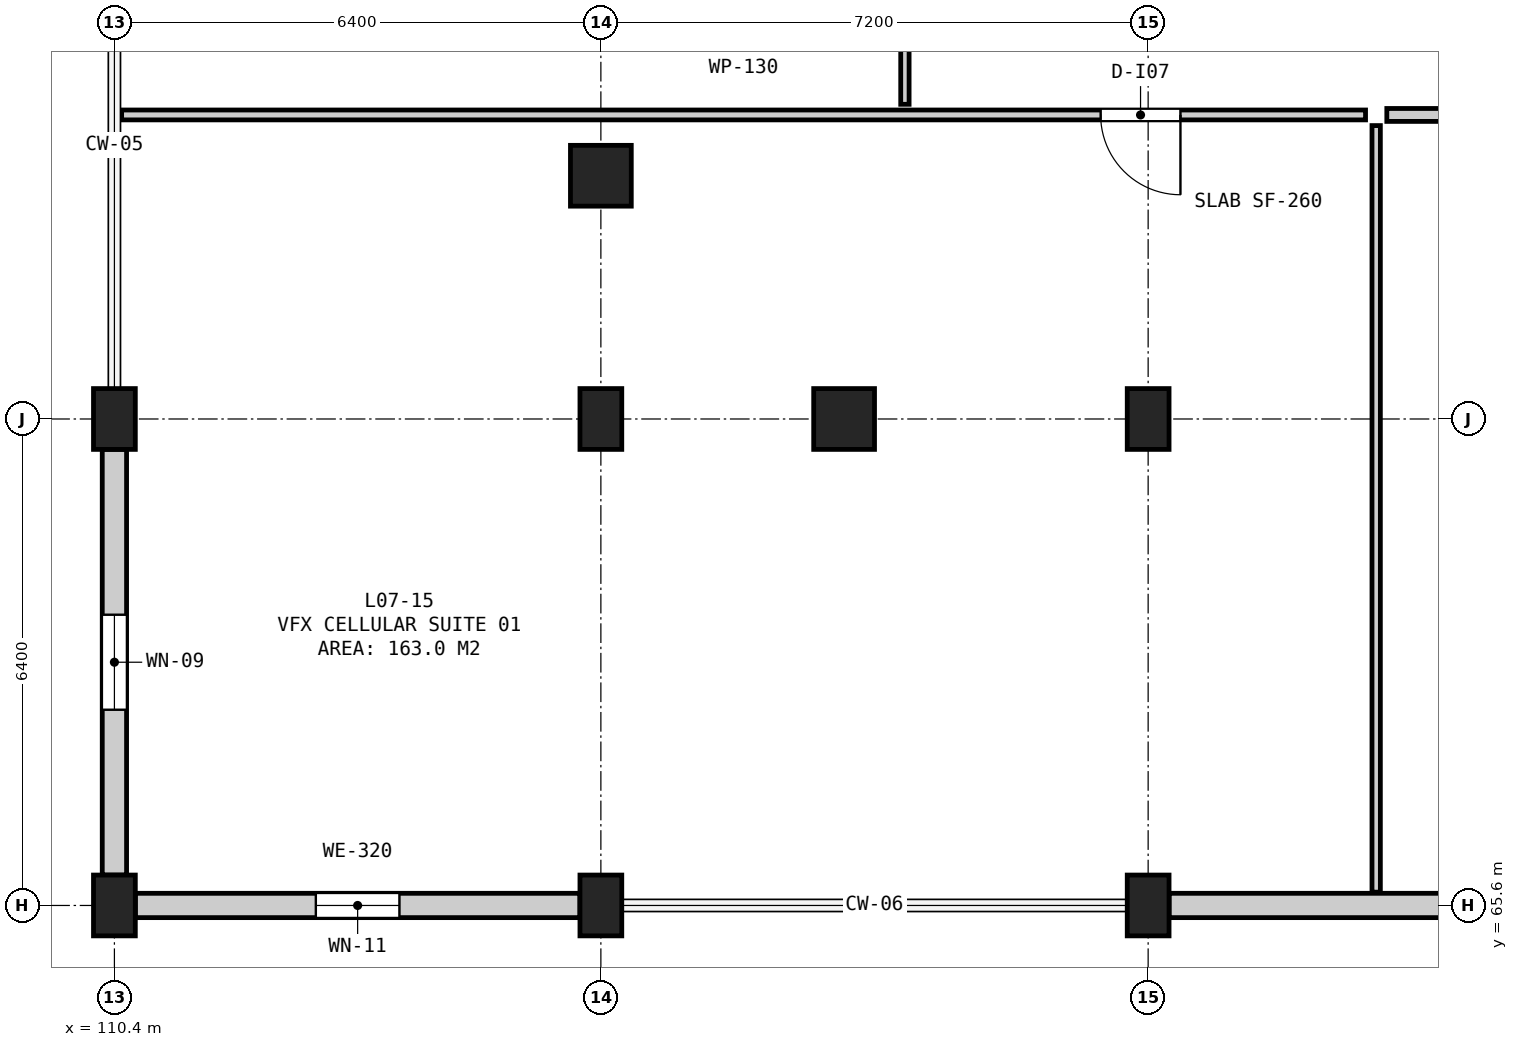
"""IFC4 building model, lengths in metres.
Left out: names, types, materials, properties, quantities, classifications, styles, units other than length and angle.
Written with IfcOpenShell. Run it as: python <this file> out.ifc"""

import sys

from ifc_helpers import new_model, si_unit, direction, frame, frame_2d, origin, origin_2d, place, context, subcontext, project, spatial, rectangle, circle, extrude, element, fill, save


model = new_model("IFC4")
c1 = context("Model", 3, precision=1e-05, world=origin(), true_north=direction((0.0, 1.0)))
c2 = subcontext(c1, "Body", "Model", "MODEL_VIEW")
j1 = project(units=[si_unit("LENGTHUNIT", "METRE"), si_unit("PLANEANGLEUNIT", "RADIAN")], contexts=[c1])
p1 = place(None, origin())
s1 = spatial("IfcSite", under=j1, at=p1, CompositionType="ELEMENT")
p2 = place(p1, origin())
s2 = spatial("IfcBuilding", under=s1, at=p2, CompositionType="ELEMENT")
p3 = place(p2, frame((0.0, 0.0, 31.7)))
s3 = spatial("IfcBuildingStorey", under=s2, at=p3, CompositionType="ELEMENT", Elevation=31.7)
for number, where, z_axis, x_axis in (
    (1, (110.4, 65.6, 0.0), (0.0, 0.0, 1.0), (1.0, 0.0, 0.0)),
    (2, (110.4, 72.0, 0.0), (0.0, 0.0, 1.0), (1.0, 0.0, 0.0)),
    (3, (116.8, 65.6, 0.0), (0.0, 0.0, 1.0), (1.0, 0.0, 0.0)),
    (4, (116.8, 72.0, 0.0), (0.0, 0.0, 1.0), (1.0, 0.0, 0.0)),
):
    element("IfcColumn", number, at=place(p3, frame(where, z_axis=z_axis, x_axis=x_axis)), inside=s3, PredefinedType="COLUMN", context=c2, shape_type="SweptSolid", body=[
        extrude(rectangle(XDim=0.55, YDim=0.8, at=origin_2d()), origin(), (0.0, 0.0, 1.0), 3.9),
    ])
for number, where, z_axis, x_axis in (
    (5, (116.8, 75.2, 0.0), (0.0, 0.0, 1.0), (1.0, 0.0, 0.0)),
    (6, (120.0, 72.0, 0.0), (0.0, 0.0, 1.0), (1.0, 0.0, 0.0)),
):
    element("IfcColumn", number, at=place(p3, frame(where, z_axis=z_axis, x_axis=x_axis)), inside=s3, PredefinedType="COLUMN", context=c2, shape_type="SweptSolid", body=[
        extrude(circle(Radius=0.4, at=origin_2d()), origin(), (0.0, 0.0, 1.0), 3.9),
    ])
for number, where, z_axis, x_axis in (
    (7, (124.0, 65.6, 0.0), (0.0, 0.0, 1.0), (1.0, 0.0, 0.0)),
    (8, (124.0, 72.0, 0.0), (0.0, 0.0, 1.0), (1.0, 0.0, 0.0)),
):
    element("IfcColumn", number, at=place(p3, frame(where, z_axis=z_axis, x_axis=x_axis)), inside=s3, PredefinedType="COLUMN", context=c2, shape_type="SweptSolid", body=[
        extrude(rectangle(XDim=0.55, YDim=0.8, at=origin_2d()), origin(), (0.0, 0.0, 1.0), 3.9),
    ])
p4 = place(p3, frame((110.675, 65.6, 0.0), z_axis=(0.0, 0.0, 1.0), x_axis=(1.0, 0.0, 0.0)))
e9 = element("IfcWall", 9, at=p4, inside=s3, PredefinedType="SOLIDWALL", context=c2, shape_type="SweptSolid", body=[
    extrude(rectangle(XDim=5.85, YDim=0.32, at=frame_2d((2.925, 0.0))), origin(), (0.0, 0.0, 1.0), 3.04),
])
p5 = place(p4, frame((2.375, 0.0, 0.9)))
e10 = element("IfcOpeningElement", 10, at=p5, cuts=e9, PredefinedType="OPENING", context=c2, shape_type="SweptSolid", body=[
    extrude(rectangle(XDim=1.1, YDim=1.55, at=frame_2d((0.55, 0.775))), frame((0.0, 0.172, 0.0), z_axis=(0.0, -1.0, 0.0), x_axis=(1.0, 0.0, 0.0)), (0.0, 0.0, 1.0), 0.344),
])
p6 = place(p3, frame((124.275, 65.6, 0.0), z_axis=(0.0, 0.0, 1.0), x_axis=(1.0, 0.0, 0.0)))
e11 = element("IfcWall", 11, at=p6, inside=s3, PredefinedType="SOLIDWALL", context=c2, shape_type="SweptSolid", body=[
    extrude(rectangle(XDim=7.45, YDim=0.32, at=frame_2d((3.725, 0.0))), origin(), (0.0, 0.0, 1.0), 3.025),
])
p7 = place(p6, frame((4.95, 0.0, 0.9)))
e12 = element("IfcOpeningElement", 12, at=p7, cuts=e11, PredefinedType="OPENING", context=c2, shape_type="SweptSolid", body=[
    extrude(rectangle(XDim=0.85, YDim=1.35, at=frame_2d((0.425, 0.675))), frame((0.0, 0.172, 0.0), z_axis=(0.0, -1.0, 0.0), x_axis=(1.0, 0.0, 0.0)), (0.0, 0.0, 1.0), 0.344),
])
p8 = place(p3, frame((110.4, 71.6, 0.0), z_axis=(0.0, 0.0, 1.0), x_axis=(0.0, -1.0, 0.0)))
e13 = element("IfcWall", 13, at=p8, inside=s3, PredefinedType="SOLIDWALL", context=c2, shape_type="SweptSolid", body=[
    extrude(rectangle(XDim=5.6, YDim=0.32, at=frame_2d((2.8, 0.0))), origin(), (0.0, 0.0, 1.0), 3.04),
])
p9 = place(p8, frame((2.175, 0.0, 0.9)))
e14 = element("IfcOpeningElement", 14, at=p9, cuts=e13, PredefinedType="OPENING", context=c2, shape_type="SweptSolid", body=[
    extrude(rectangle(XDim=1.25, YDim=1.9, at=frame_2d((0.625, 0.95))), frame((0.0, 0.172, 0.0), z_axis=(0.0, -1.0, 0.0), x_axis=(1.0, 0.0, 0.0)), (0.0, 0.0, 1.0), 0.344),
])
p10 = place(p3, frame((110.495, 76.0, 0.0), z_axis=(0.0, 0.0, 1.0), x_axis=(1.0, 0.0, 0.0)))
e15 = element("IfcWall", 15, at=p10, inside=s3, PredefinedType="PARTITIONING", context=c2, shape_type="SweptSolid", body=[
    extrude(rectangle(XDim=16.365, YDim=0.13, at=frame_2d((8.183, 0.0))), origin(), (0.0, 0.0, 1.0), 3.62),
])
p11 = place(p10, frame((12.88, 0.0, 0.0)))
e16 = element("IfcOpeningElement", 16, at=p11, cuts=e15, PredefinedType="OPENING", context=c2, shape_type="SweptSolid", body=[
    extrude(rectangle(XDim=1.05, YDim=2.15, at=frame_2d((0.525, 1.075))), frame((0.0, 0.077, 0.0), z_axis=(0.0, -1.0, 0.0), x_axis=(1.0, 0.0, 0.0)), (0.0, 0.0, 1.0), 0.154),
])
p12 = place(p3, frame((127.0, 65.775, 0.0), z_axis=(0.0, 0.0, 1.0), x_axis=(0.0, 1.0, 0.0)))
e17 = element("IfcWall", 17, at=p12, inside=s3, PredefinedType="PARTITIONING", context=c2, shape_type="SweptSolid", body=[
    extrude(rectangle(XDim=10.085, YDim=0.11, at=frame_2d((5.042, 0.0))), origin(), (0.0, 0.0, 1.0), 3.62),
])
p13 = place(p3, frame((127.14, 76.0, 0.0), z_axis=(0.0, 0.0, 1.0), x_axis=(1.0, 0.0, 0.0)))
e18 = element("IfcWall", 18, at=p13, inside=s3, PredefinedType="PARTITIONING", context=c2, shape_type="SweptSolid", body=[
    extrude(rectangle(XDim=11.72, YDim=0.17, at=frame_2d((5.86, 0.0))), origin(), (0.0, 0.0, 1.0), 3.62),
])
p14 = place(p13, frame((8.135, 0.0, 0.0)))
e19 = element("IfcOpeningElement", 19, at=p14, cuts=e18, PredefinedType="OPENING", context=c2, shape_type="SweptSolid", body=[
    extrude(rectangle(XDim=1.05, YDim=2.15, at=frame_2d((0.525, 1.075))), frame((0.0, 0.097, 0.0), z_axis=(0.0, -1.0, 0.0), x_axis=(1.0, 0.0, 0.0)), (0.0, 0.0, 1.0), 0.194),
])
p15 = place(p3, frame((120.8, 76.14, 0.0), z_axis=(0.0, 0.0, 1.0), x_axis=(0.0, 1.0, 0.0)))
e20 = element("IfcWall", 20, at=p15, inside=s3, PredefinedType="PARTITIONING", context=c2, shape_type="SweptSolid", body=[
    extrude(rectangle(XDim=22.12, YDim=0.11, at=frame_2d((11.06, 0.0))), origin(), (0.0, 0.0, 1.0), 3.62),
])
p16 = place(p15, frame((10.535, 0.0, 0.0)))
e21 = element("IfcOpeningElement", 21, at=p16, cuts=e20, PredefinedType="OPENING", context=c2, shape_type="SweptSolid", body=[
    extrude(rectangle(XDim=1.05, YDim=2.15, at=frame_2d((0.525, 1.075))), frame((0.0, 0.067, 0.0), z_axis=(0.0, -1.0, 0.0), x_axis=(1.0, 0.0, 0.0)), (0.0, 0.0, 1.0), 0.134),
])
p17 = place(p5, origin())
e22 = element("IfcWindow", 22, at=p17, inside=s3, PartitioningType="SINGLE_PANEL", PredefinedType="WINDOW", context=c2, shape_type="SweptSolid", body=[
    extrude(rectangle(XDim=1.1, YDim=1.55, at=frame_2d((0.55, 0.775))), frame((0.0, 0.03, 0.0), z_axis=(0.0, -1.0, 0.0), x_axis=(1.0, 0.0, 0.0)), (0.0, 0.0, 1.0), 0.06),
])
fill(e10, e22)
p18 = place(p9, origin())
e23 = element("IfcWindow", 23, at=p18, inside=s3, PartitioningType="SINGLE_PANEL", PredefinedType="WINDOW", context=c2, shape_type="SweptSolid", body=[
    extrude(rectangle(XDim=1.25, YDim=1.9, at=frame_2d((0.625, 0.95))), frame((0.0, 0.03, 0.0), z_axis=(0.0, -1.0, 0.0), x_axis=(1.0, 0.0, 0.0)), (0.0, 0.0, 1.0), 0.06),
])
fill(e14, e23)
p19 = place(p11, frame((1.05, 0.0, 0.0), z_axis=(0.0, 0.0, 1.0), x_axis=(-1.0, 0.0, 0.0)))
e24 = element("IfcDoor", 24, at=p19, inside=s3, OperationType="SINGLE_SWING_LEFT", PredefinedType="DOOR", context=c2, shape_type="SweptSolid", body=[
    extrude(rectangle(XDim=1.05, YDim=2.15, at=frame_2d((0.525, 1.075))), frame((0.0, 0.025, 0.0), z_axis=(0.0, -1.0, 0.0), x_axis=(1.0, 0.0, 0.0)), (0.0, 0.0, 1.0), 0.05),
])
fill(e16, e24)
save(model, sys.argv[1])
